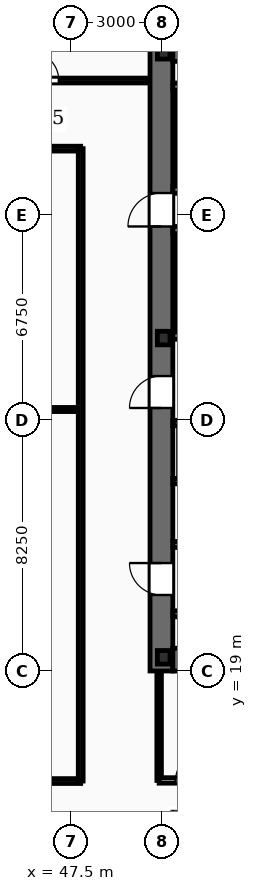
"""IFC4 building model, lengths in metres.
Left out: names, types, materials, properties, quantities, classifications, styles, units other than length and angle.
Written with IfcOpenShell. Run it as: python <this file> out.ifc"""

import sys

from ifc_helpers import new_model, si_unit, direction, frame, frame_2d, origin, origin_2d, place, context, subcontext, project, spatial, rectangle, i_section, extrude, element, fill, save


model = new_model("IFC4")
c1 = context("Model", 3, precision=1e-05, world=origin(), true_north=direction((0.0, 1.0)))
c2 = subcontext(c1, "Body", "Model", "MODEL_VIEW")
j1 = project(units=[si_unit("LENGTHUNIT", "METRE"), si_unit("PLANEANGLEUNIT", "RADIAN")], contexts=[c1])
p1 = place(None, origin())
s1 = spatial("IfcSite", under=j1, at=p1, CompositionType="ELEMENT")
p2 = place(p1, origin())
s2 = spatial("IfcBuilding", under=s1, at=p2, CompositionType="ELEMENT")
p3 = place(p2, frame((0.0, 0.0, 138.25)))
s3 = spatial("IfcBuildingStorey", under=s2, at=p3, CompositionType="ELEMENT", Elevation=138.25)
p4 = place(p3, frame((50.475, 19.0, -0.27), z_axis=(0.0, 0.0, 1.0), x_axis=(0.0, 1.0, 0.0)))
e1 = element("IfcWall", 1, at=p4, inside=s3, PredefinedType="SHEAR", context=c2, shape_type="SweptSolid", body=[
    extrude(rectangle(XDim=20.8, YDim=0.75, at=frame_2d((10.4, 0.0))), origin(), (0.0, 0.0, 1.0), 3.75),
])
p5 = place(p4, frame((2.5, 0.0, 0.27)))
e2 = element("IfcOpeningElement", 2, at=p5, cuts=e1, PredefinedType="OPENING", context=c2, shape_type="SweptSolid", body=[
    extrude(rectangle(XDim=1.05, YDim=2.15, at=frame_2d((0.525, 1.075))), frame((0.0, 0.385, 0.0), z_axis=(0.0, -1.0, 0.0), x_axis=(1.0, 0.0, 0.0)), (0.0, 0.0, 1.0), 0.77),
])
p6 = place(p4, frame((8.65, 0.0, 0.27)))
e3 = element("IfcOpeningElement", 3, at=p6, cuts=e1, PredefinedType="OPENING", context=c2, shape_type="SweptSolid", body=[
    extrude(rectangle(XDim=1.05, YDim=2.15, at=frame_2d((0.525, 1.075))), frame((0.0, 0.385, 0.0), z_axis=(0.0, -1.0, 0.0), x_axis=(1.0, 0.0, 0.0)), (0.0, 0.0, 1.0), 0.77),
])
p7 = place(p4, frame((14.62, 0.0, 0.27)))
e4 = element("IfcOpeningElement", 4, at=p7, cuts=e1, PredefinedType="OPENING", context=c2, shape_type="SweptSolid", body=[
    extrude(rectangle(XDim=1.1, YDim=2.15, at=frame_2d((0.55, 1.075))), frame((0.0, 0.385, 0.0), z_axis=(0.0, -1.0, 0.0), x_axis=(1.0, 0.0, 0.0)), (0.0, 0.0, 1.0), 0.77),
])
for number, where, z_axis, x_axis in (
    (5, (50.85, 19.375, -0.27), (0.0, 0.0, 1.0), (1.0, 0.0, 0.0)),
    (6, (50.85, 39.425, -0.27), (0.0, 0.0, 1.0), (1.0, 0.0, 0.0)),
):
    element("IfcWall", number, at=place(p3, frame(where, z_axis=z_axis, x_axis=x_axis)), inside=s3, PredefinedType="SHEAR", context=c2, shape_type="SweptSolid", body=[
        extrude(rectangle(XDim=9.2, YDim=0.75, at=frame_2d((4.6, 0.0))), origin(), (0.0, 0.0, 1.0), 3.75),
    ])
for number, where, z_axis, x_axis in (
    (7, (50.55, 19.45, -0.27), (0.0, 0.0, 1.0), (1.0, 0.0, 0.0)),
    (8, (50.55, 29.95, -0.27), (0.0, 0.0, 1.0), (1.0, 0.0, 0.0)),
    (9, (50.55, 39.35, -0.27), (0.0, 0.0, 1.0), (1.0, 0.0, 0.0)),
):
    element("IfcColumn", number, at=place(p3, frame(where, z_axis=z_axis, x_axis=x_axis)), inside=s3, PredefinedType="COLUMN", context=c2, shape_type="SweptSolid", body=[
        extrude(i_section(OverallWidth=0.416, OverallDepth=0.446, WebThickness=0.039, FlangeThickness=0.063, FilletRadius=0.02, at=origin_2d()), origin(), (0.0, 0.0, 1.0), 3.75),
    ])
p8 = place(p3, frame((60.05, 30.03, 0.0), z_axis=(0.0, 0.0, 1.0), x_axis=(-1.0, 0.0, 0.0)))
e10 = element("IfcWall", 10, at=p8, inside=s3, PredefinedType="SOLIDWALL", context=c2, shape_type="SweptSolid", body=[
    extrude(rectangle(XDim=9.2, YDim=0.24, at=frame_2d((4.6, 0.0))), origin(), (0.0, 0.0, 1.0), 3.48),
])
p9 = place(p8, frame((7.53, 0.0, 0.0)))
e11 = element("IfcOpeningElement", 11, at=p9, cuts=e10, PredefinedType="OPENING", context=c2, shape_type="SweptSolid", body=[
    extrude(rectangle(XDim=1.1, YDim=2.15, at=frame_2d((0.55, 1.075))), frame((0.0, 0.13, 0.0), z_axis=(0.0, -1.0, 0.0), x_axis=(1.0, 0.0, 0.0)), (0.0, 0.0, 1.0), 0.26),
])
p10 = place(p3, frame((50.85, 33.5, 0.0), z_axis=(0.0, 0.0, 1.0), x_axis=(1.0, 0.0, 0.0)))
e12 = element("IfcWall", 12, at=p10, inside=s3, PredefinedType="SOLIDWALL", context=c2, shape_type="SweptSolid", body=[
    extrude(rectangle(XDim=9.2, YDim=0.24, at=frame_2d((4.6, 0.0))), origin(), (0.0, 0.0, 1.0), 3.48),
])
p11 = place(p3, frame((51.06, 30.15, 0.0), z_axis=(0.0, 0.0, 1.0), x_axis=(0.0, 1.0, 0.0)))
e13 = element("IfcWall", 13, at=p11, inside=s3, PredefinedType="SOLIDWALL", context=c2, shape_type="SweptSolid", body=[
    extrude(rectangle(XDim=3.23, YDim=0.24, at=frame_2d((1.615, 0.0))), origin(), (0.0, 0.0, 1.0), 3.48),
])
p12 = place(p3, frame((60.05, 34.83, 0.0), z_axis=(0.0, 0.0, 1.0), x_axis=(-1.0, 0.0, 0.0)))
e14 = element("IfcWall", 14, at=p12, inside=s3, PredefinedType="SOLIDWALL", context=c2, shape_type="SweptSolid", body=[
    extrude(rectangle(XDim=9.2, YDim=0.24, at=frame_2d((4.6, 0.0))), origin(), (0.0, 0.0, 1.0), 3.48),
])
p13 = place(p12, frame((7.57, 0.0, 0.0)))
e15 = element("IfcOpeningElement", 15, at=p13, cuts=e14, PredefinedType="OPENING", context=c2, shape_type="SweptSolid", body=[
    extrude(rectangle(XDim=1.1, YDim=2.15, at=frame_2d((0.55, 1.075))), frame((0.0, 0.13, 0.0), z_axis=(0.0, -1.0, 0.0), x_axis=(1.0, 0.0, 0.0)), (0.0, 0.0, 1.0), 0.26),
])
p14 = place(p3, frame((50.85, 38.22, 0.0), z_axis=(0.0, 0.0, 1.0), x_axis=(1.0, 0.0, 0.0)))
e16 = element("IfcWall", 16, at=p14, inside=s3, PredefinedType="SOLIDWALL", context=c2, shape_type="SweptSolid", body=[
    extrude(rectangle(XDim=9.2, YDim=0.24, at=frame_2d((4.6, 0.0))), origin(), (0.0, 0.0, 1.0), 3.48),
])
p15 = place(p3, frame((51.06, 34.95, 0.0), z_axis=(0.0, 0.0, 1.0), x_axis=(0.0, 1.0, 0.0)))
e17 = element("IfcWall", 17, at=p15, inside=s3, PredefinedType="SOLIDWALL", context=c2, shape_type="SweptSolid", body=[
    extrude(rectangle(XDim=3.15, YDim=0.24, at=frame_2d((1.575, 0.0))), origin(), (0.0, 0.0, 1.0), 3.48),
])
p16 = place(p3, frame((50.85, 27.155, 0.0), z_axis=(0.0, 0.0, 1.0), x_axis=(1.0, 0.0, 0.0)))
e18 = element("IfcWall", 18, at=p16, inside=s3, PredefinedType="SOLIDWALL", context=c2, shape_type="SweptSolid", body=[
    extrude(rectangle(XDim=3.015, YDim=0.18, at=frame_2d((1.507, 0.0))), origin(), (0.0, 0.0, 1.0), 3.48),
])
p17 = place(p16, frame((0.935, 0.0, 0.0)))
e19 = element("IfcOpeningElement", 19, at=p17, cuts=e18, PredefinedType="OPENING", context=c2, shape_type="SweptSolid", body=[
    extrude(rectangle(XDim=1.35, YDim=2.3, at=frame_2d((0.675, 1.15))), frame((0.0, 0.1, 0.0), z_axis=(0.0, -1.0, 0.0), x_axis=(1.0, 0.0, 0.0)), (0.0, 0.0, 1.0), 0.2),
])
p18 = place(p3, frame((50.85, 25.245, 0.0), z_axis=(0.0, 0.0, 1.0), x_axis=(1.0, 0.0, 0.0)))
e20 = element("IfcWall", 20, at=p18, inside=s3, PredefinedType="SOLIDWALL", context=c2, shape_type="SweptSolid", body=[
    extrude(rectangle(XDim=3.015, YDim=0.18, at=frame_2d((1.507, 0.0))), origin(), (0.0, 0.0, 1.0), 3.48),
])
p19 = place(p3, frame((50.85, 20.88, 0.0), z_axis=(0.0, 0.0, 1.0), x_axis=(1.0, 0.0, 0.0)))
e21 = element("IfcWall", 21, at=p19, inside=s3, PredefinedType="SOLIDWALL", context=c2, shape_type="SweptSolid", body=[
    extrude(rectangle(XDim=9.2, YDim=0.2, at=frame_2d((4.6, 0.0))), origin(), (0.0, 0.0, 1.0), 2.54),
])
p20 = place(p19, frame((1.4, 0.0, 0.0)))
e22 = element("IfcOpeningElement", 22, at=p20, cuts=e21, PredefinedType="OPENING", context=c2, shape_type="SweptSolid", body=[
    extrude(rectangle(XDim=1.05, YDim=2.15, at=frame_2d((0.525, 1.075))), frame((0.0, 0.11, 0.0), z_axis=(0.0, -1.0, 0.0), x_axis=(1.0, 0.0, 0.0)), (0.0, 0.0, 1.0), 0.22),
])
p21 = place(p19, frame((5.5, 0.0, 0.0)))
e23 = element("IfcOpeningElement", 23, at=p21, cuts=e21, PredefinedType="OPENING", context=c2, shape_type="SweptSolid", body=[
    extrude(rectangle(XDim=1.05, YDim=2.15, at=frame_2d((0.525, 1.075))), frame((0.0, 0.11, 0.0), z_axis=(0.0, -1.0, 0.0), x_axis=(1.0, 0.0, 0.0)), (0.0, 0.0, 1.0), 0.22),
])
p22 = place(p3, frame((50.85, 23.16, 0.0), z_axis=(0.0, 0.0, 1.0), x_axis=(1.0, 0.0, 0.0)))
e24 = element("IfcWall", 24, at=p22, inside=s3, PredefinedType="SOLIDWALL", context=c2, shape_type="SweptSolid", body=[
    extrude(rectangle(XDim=3.03, YDim=0.2, at=frame_2d((1.515, 0.0))), origin(), (0.0, 0.0, 1.0), 2.54),
])
p23 = place(p22, frame((0.55, 0.0, 0.0)))
e25 = element("IfcOpeningElement", 25, at=p23, cuts=e24, PredefinedType="OPENING", context=c2, shape_type="SweptSolid", body=[
    extrude(rectangle(XDim=0.86, YDim=2.05, at=frame_2d((0.43, 1.025))), frame((0.0, 0.11, 0.0), z_axis=(0.0, -1.0, 0.0), x_axis=(1.0, 0.0, 0.0)), (0.0, 0.0, 1.0), 0.22),
])
p24 = place(p3, frame((50.4, 15.4, 0.0), z_axis=(0.0, 0.0, 1.0), x_axis=(1.0, 0.0, 0.0)))
e26 = element("IfcWall", 26, at=p24, inside=s3, PredefinedType="SOLIDWALL", context=c2, shape_type="SweptSolid", body=[
    extrude(rectangle(XDim=10.0, YDim=0.18, at=frame_2d((5.0, 0.0))), origin(), (0.0, 0.0, 1.0), 2.54),
])
p25 = place(p24, frame((0.54, 0.0, 0.0)))
e27 = element("IfcOpeningElement", 27, at=p25, cuts=e26, PredefinedType="OPENING", context=c2, shape_type="SweptSolid", body=[
    extrude(rectangle(XDim=0.92, YDim=2.1, at=frame_2d((0.46, 1.05))), frame((0.0, 0.1, 0.0), z_axis=(0.0, -1.0, 0.0), x_axis=(1.0, 0.0, 0.0)), (0.0, 0.0, 1.0), 0.2),
])
p26 = place(p24, frame((2.54, 0.0, 0.0)))
e28 = element("IfcOpeningElement", 28, at=p26, cuts=e26, PredefinedType="OPENING", context=c2, shape_type="SweptSolid", body=[
    extrude(rectangle(XDim=0.92, YDim=2.1, at=frame_2d((0.46, 1.05))), frame((0.0, 0.1, 0.0), z_axis=(0.0, -1.0, 0.0), x_axis=(1.0, 0.0, 0.0)), (0.0, 0.0, 1.0), 0.2),
])
p27 = place(p24, frame((4.54, 0.0, 0.0)))
e29 = element("IfcOpeningElement", 29, at=p27, cuts=e26, PredefinedType="OPENING", context=c2, shape_type="SweptSolid", body=[
    extrude(rectangle(XDim=0.92, YDim=2.1, at=frame_2d((0.46, 1.05))), frame((0.0, 0.1, 0.0), z_axis=(0.0, -1.0, 0.0), x_axis=(1.0, 0.0, 0.0)), (0.0, 0.0, 1.0), 0.2),
])
p28 = place(p24, frame((6.54, 0.0, 0.0)))
e30 = element("IfcOpeningElement", 30, at=p28, cuts=e26, PredefinedType="OPENING", context=c2, shape_type="SweptSolid", body=[
    extrude(rectangle(XDim=0.92, YDim=2.1, at=frame_2d((0.46, 1.05))), frame((0.0, 0.1, 0.0), z_axis=(0.0, -1.0, 0.0), x_axis=(1.0, 0.0, 0.0)), (0.0, 0.0, 1.0), 0.2),
])
p29 = place(p24, frame((8.57, 0.0, 0.0)))
e31 = element("IfcOpeningElement", 31, at=p29, cuts=e26, PredefinedType="OPENING", context=c2, shape_type="SweptSolid", body=[
    extrude(rectangle(XDim=0.86, YDim=2.05, at=frame_2d((0.43, 1.025))), frame((0.0, 0.1, 0.0), z_axis=(0.0, -1.0, 0.0), x_axis=(1.0, 0.0, 0.0)), (0.0, 0.0, 1.0), 0.2),
])
p30 = place(p3, frame((50.4, 15.4, 0.0), z_axis=(0.0, 0.0, 1.0), x_axis=(0.0, 1.0, 0.0)))
e32 = element("IfcWall", 32, at=p30, inside=s3, PredefinedType="PARTITIONING", context=c2, shape_type="SweptSolid", body=[
    extrude(rectangle(XDim=3.58, YDim=0.15, at=frame_2d((1.79, 0.0))), origin(), (0.0, 0.0, 1.0), 2.54),
])
p31 = place(p3, frame((24.82, 38.42, 0.0), z_axis=(0.0, 0.0, 1.0), x_axis=(1.0, 0.0, 0.0)))
e33 = element("IfcWall", 33, at=p31, inside=s3, PredefinedType="PARTITIONING", context=c2, shape_type="SweptSolid", body=[
    extrude(rectangle(XDim=25.26, YDim=0.16, at=frame_2d((12.63, 0.0))), origin(), (0.0, 0.0, 1.0), 2.54),
])
p32 = place(p31, frame((3.855, 0.0, 0.0)))
e34 = element("IfcOpeningElement", 34, at=p32, cuts=e33, PredefinedType="OPENING", context=c2, shape_type="SweptSolid", body=[
    extrude(rectangle(XDim=0.95, YDim=2.15, at=frame_2d((0.475, 1.075))), frame((0.0, 0.09, 0.0), z_axis=(0.0, -1.0, 0.0), x_axis=(1.0, 0.0, 0.0)), (0.0, 0.0, 1.0), 0.18),
])
p33 = place(p31, frame((13.705, 0.0, 0.0)))
e35 = element("IfcOpeningElement", 35, at=p33, cuts=e33, PredefinedType="OPENING", context=c2, shape_type="SweptSolid", body=[
    extrude(rectangle(XDim=0.95, YDim=2.15, at=frame_2d((0.475, 1.075))), frame((0.0, 0.09, 0.0), z_axis=(0.0, -1.0, 0.0), x_axis=(1.0, 0.0, 0.0)), (0.0, 0.0, 1.0), 0.18),
])
p34 = place(p31, frame((21.33, 0.0, 0.0)))
e36 = element("IfcOpeningElement", 36, at=p34, cuts=e33, PredefinedType="OPENING", context=c2, shape_type="SweptSolid", body=[
    extrude(rectangle(XDim=0.95, YDim=2.15, at=frame_2d((0.475, 1.075))), frame((0.0, 0.09, 0.0), z_axis=(0.0, -1.0, 0.0), x_axis=(1.0, 0.0, 0.0)), (0.0, 0.0, 1.0), 0.18),
])
p35 = place(p3, frame((27.08, 27.6, 0.0), z_axis=(0.0, 0.0, 1.0), x_axis=(1.0, 0.0, 0.0)))
e37 = element("IfcWall", 37, at=p35, inside=s3, PredefinedType="PARTITIONING", context=c2, shape_type="SweptSolid", body=[
    extrude(rectangle(XDim=20.74, YDim=0.135, at=frame_2d((10.37, 0.0))), origin(), (0.0, 0.0, 1.0), 2.54),
])
p36 = place(p3, frame((27.08, 36.18, 0.0), z_axis=(0.0, 0.0, 1.0), x_axis=(1.0, 0.0, 0.0)))
e38 = element("IfcWall", 38, at=p36, inside=s3, PredefinedType="PARTITIONING", context=c2, shape_type="SweptSolid", body=[
    extrude(rectangle(XDim=20.74, YDim=0.16, at=frame_2d((10.37, 0.0))), origin(), (0.0, 0.0, 1.0), 2.54),
])
p37 = place(p36, frame((1.095, 0.0, 0.0)))
e39 = element("IfcOpeningElement", 39, at=p37, cuts=e38, PredefinedType="OPENING", context=c2, shape_type="SweptSolid", body=[
    extrude(rectangle(XDim=0.95, YDim=2.15, at=frame_2d((0.475, 1.075))), frame((0.0, 0.09, 0.0), z_axis=(0.0, -1.0, 0.0), x_axis=(1.0, 0.0, 0.0)), (0.0, 0.0, 1.0), 0.18),
])
p38 = place(p36, frame((5.545, 0.0, 0.0)))
e40 = element("IfcOpeningElement", 40, at=p38, cuts=e38, PredefinedType="OPENING", context=c2, shape_type="SweptSolid", body=[
    extrude(rectangle(XDim=0.95, YDim=2.15, at=frame_2d((0.475, 1.075))), frame((0.0, 0.09, 0.0), z_axis=(0.0, -1.0, 0.0), x_axis=(1.0, 0.0, 0.0)), (0.0, 0.0, 1.0), 0.18),
])
p39 = place(p36, frame((11.445, 0.0, 0.0)))
e41 = element("IfcOpeningElement", 41, at=p39, cuts=e38, PredefinedType="OPENING", context=c2, shape_type="SweptSolid", body=[
    extrude(rectangle(XDim=0.95, YDim=2.15, at=frame_2d((0.475, 1.075))), frame((0.0, 0.09, 0.0), z_axis=(0.0, -1.0, 0.0), x_axis=(1.0, 0.0, 0.0)), (0.0, 0.0, 1.0), 0.18),
])
p40 = place(p36, frame((18.295, 0.0, 0.0)))
e42 = element("IfcOpeningElement", 42, at=p40, cuts=e38, PredefinedType="OPENING", context=c2, shape_type="SweptSolid", body=[
    extrude(rectangle(XDim=0.95, YDim=2.15, at=frame_2d((0.475, 1.075))), frame((0.0, 0.09, 0.0), z_axis=(0.0, -1.0, 0.0), x_axis=(1.0, 0.0, 0.0)), (0.0, 0.0, 1.0), 0.18),
])
p41 = place(p3, frame((27.08, 15.38, 0.0), z_axis=(0.0, 0.0, 1.0), x_axis=(1.0, 0.0, 0.0)))
e43 = element("IfcWall", 43, at=p41, inside=s3, PredefinedType="PARTITIONING", context=c2, shape_type="SweptSolid", body=[
    extrude(rectangle(XDim=20.74, YDim=0.16, at=frame_2d((10.37, 0.0))), origin(), (0.0, 0.0, 1.0), 2.54),
])
p42 = place(p41, frame((1.095, 0.0, 0.0)))
e44 = element("IfcOpeningElement", 44, at=p42, cuts=e43, PredefinedType="OPENING", context=c2, shape_type="SweptSolid", body=[
    extrude(rectangle(XDim=0.95, YDim=2.15, at=frame_2d((0.475, 1.075))), frame((0.0, 0.09, 0.0), z_axis=(0.0, -1.0, 0.0), x_axis=(1.0, 0.0, 0.0)), (0.0, 0.0, 1.0), 0.18),
])
p43 = place(p41, frame((5.545, 0.0, 0.0)))
e45 = element("IfcOpeningElement", 45, at=p43, cuts=e43, PredefinedType="OPENING", context=c2, shape_type="SweptSolid", body=[
    extrude(rectangle(XDim=0.95, YDim=2.15, at=frame_2d((0.475, 1.075))), frame((0.0, 0.09, 0.0), z_axis=(0.0, -1.0, 0.0), x_axis=(1.0, 0.0, 0.0)), (0.0, 0.0, 1.0), 0.18),
])
p44 = place(p41, frame((11.445, 0.0, 0.0)))
e46 = element("IfcOpeningElement", 46, at=p44, cuts=e43, PredefinedType="OPENING", context=c2, shape_type="SweptSolid", body=[
    extrude(rectangle(XDim=0.95, YDim=2.15, at=frame_2d((0.475, 1.075))), frame((0.0, 0.09, 0.0), z_axis=(0.0, -1.0, 0.0), x_axis=(1.0, 0.0, 0.0)), (0.0, 0.0, 1.0), 0.18),
])
p45 = place(p41, frame((18.295, 0.0, 0.0)))
e47 = element("IfcOpeningElement", 47, at=p45, cuts=e43, PredefinedType="OPENING", context=c2, shape_type="SweptSolid", body=[
    extrude(rectangle(XDim=0.95, YDim=2.15, at=frame_2d((0.475, 1.075))), frame((0.0, 0.09, 0.0), z_axis=(0.0, -1.0, 0.0), x_axis=(1.0, 0.0, 0.0)), (0.0, 0.0, 1.0), 0.18),
])
p46 = place(p3, frame((47.82, 15.38, 0.0), z_axis=(0.0, 0.0, 1.0), x_axis=(0.0, 1.0, 0.0)))
e48 = element("IfcWall", 48, at=p46, inside=s3, PredefinedType="PARTITIONING", context=c2, shape_type="SweptSolid", body=[
    extrude(rectangle(XDim=20.8, YDim=0.16, at=frame_2d((10.4, 0.0))), origin(), (0.0, 0.0, 1.0), 2.54),
])
p47 = place(p5, origin())
e49 = element("IfcDoor", 49, at=p47, inside=s3, OperationType="SINGLE_SWING_RIGHT", PredefinedType="DOOR", context=c2, shape_type="SweptSolid", body=[
    extrude(rectangle(XDim=1.05, YDim=2.15, at=frame_2d((0.525, 1.075))), frame((0.0, 0.025, 0.0), z_axis=(0.0, -1.0, 0.0), x_axis=(1.0, 0.0, 0.0)), (0.0, 0.0, 1.0), 0.05),
])
fill(e2, e49)
p48 = place(p6, origin())
e50 = element("IfcDoor", 50, at=p48, inside=s3, OperationType="SINGLE_SWING_LEFT", PredefinedType="DOOR", context=c2, shape_type="SweptSolid", body=[
    extrude(rectangle(XDim=1.05, YDim=2.15, at=frame_2d((0.525, 1.075))), frame((0.0, 0.025, 0.0), z_axis=(0.0, -1.0, 0.0), x_axis=(1.0, 0.0, 0.0)), (0.0, 0.0, 1.0), 0.05),
])
fill(e3, e50)
p49 = place(p7, origin())
e51 = element("IfcDoor", 51, at=p49, inside=s3, OperationType="SINGLE_SWING_LEFT", PredefinedType="DOOR", context=c2, shape_type="SweptSolid", body=[
    extrude(rectangle(XDim=1.1, YDim=2.15, at=frame_2d((0.55, 1.075))), frame((0.0, 0.025, 0.0), z_axis=(0.0, -1.0, 0.0), x_axis=(1.0, 0.0, 0.0)), (0.0, 0.0, 1.0), 0.05),
])
fill(e4, e51)
p50 = place(p25, origin())
e52 = element("IfcDoor", 52, at=p50, inside=s3, OperationType="SINGLE_SWING_RIGHT", PredefinedType="DOOR", context=c2, shape_type="SweptSolid", body=[
    extrude(rectangle(XDim=0.92, YDim=2.1, at=frame_2d((0.46, 1.05))), frame((0.0, 0.025, 0.0), z_axis=(0.0, -1.0, 0.0), x_axis=(1.0, 0.0, 0.0)), (0.0, 0.0, 1.0), 0.05),
])
fill(e27, e52)
p51 = place(p34, origin())
e53 = element("IfcDoor", 53, at=p51, inside=s3, OperationType="SINGLE_SWING_LEFT", PredefinedType="DOOR", context=c2, shape_type="SweptSolid", body=[
    extrude(rectangle(XDim=0.95, YDim=2.15, at=frame_2d((0.475, 1.075))), frame((0.0, 0.025, 0.0), z_axis=(0.0, -1.0, 0.0), x_axis=(1.0, 0.0, 0.0)), (0.0, 0.0, 1.0), 0.05),
])
fill(e36, e53)
save(model, sys.argv[1])
